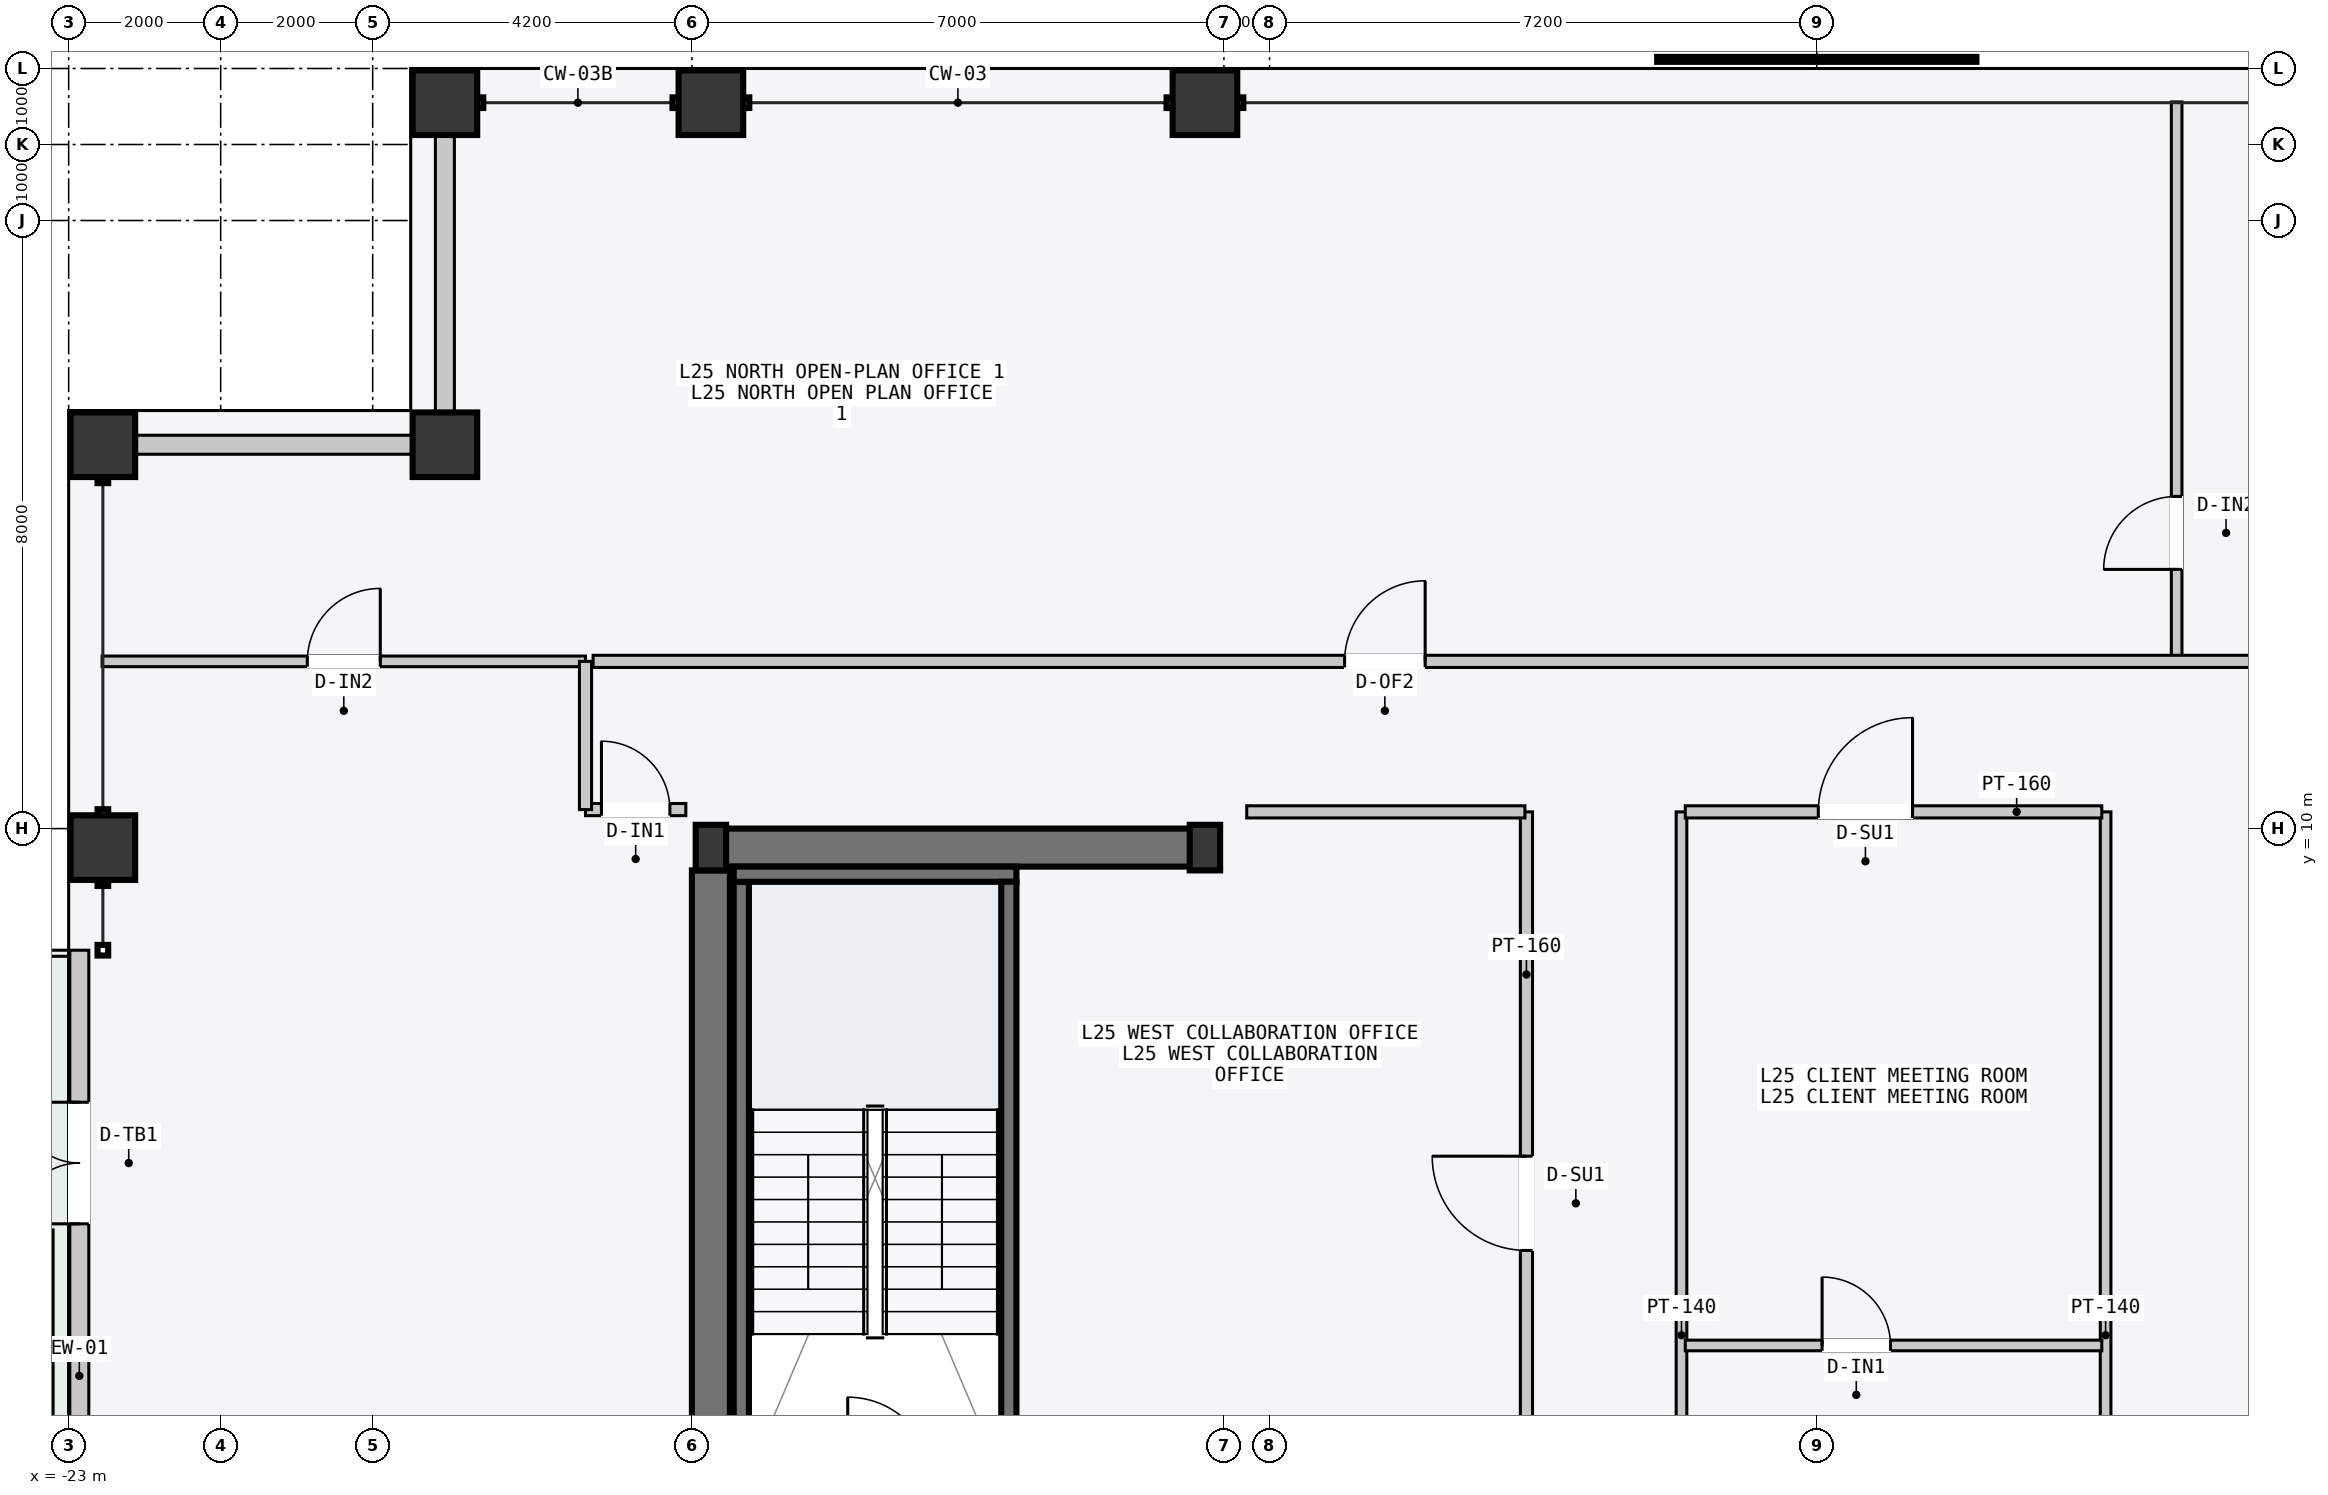
"""IFC4 building model, lengths in metres.
Left out: names, types, materials, properties, quantities, classifications, styles, units other than length and angle.
Written with IfcOpenShell. Run it as: python <this file> out.ifc"""

import sys

from ifc_helpers import new_model, si_unit, direction, frame, frame_2d, origin, origin_2d, place, context, subcontext, project, spatial, rectangle, hollow_rectangle, i_section, extrude, element, fill, save


model = new_model("IFC4")
c1 = context("Model", 3, precision=1e-05, world=origin(), true_north=direction((0.0, 1.0)))
c2 = subcontext(c1, "Body", "Model", "MODEL_VIEW")
j1 = project(units=[si_unit("LENGTHUNIT", "METRE"), si_unit("PLANEANGLEUNIT", "RADIAN")], contexts=[c1])
p1 = place(None, origin())
s1 = spatial("IfcSite", under=j1, at=p1, CompositionType="ELEMENT")
p2 = place(p1, origin())
s2 = spatial("IfcBuilding", under=s1, at=p2, CompositionType="ELEMENT")
p3 = place(p2, frame((0.0, 0.0, 99.0)))
s3 = spatial("IfcBuildingStorey", under=s2, at=p3, CompositionType="ELEMENT", Elevation=99.0)
p4 = place(p3, frame((-14.53, 9.75, -0.2), z_axis=(0.0, 0.0, 1.0), x_axis=(1.0, 0.0, 0.0)))
e1 = element("IfcWall", 1, at=p4, inside=s3, PredefinedType="SHEAR", context=c2, shape_type="SweptSolid", body=[
    extrude(rectangle(XDim=6.46, YDim=0.5, at=frame_2d((3.23, 0.0))), origin(), (0.0, 0.0, 1.0), 3.6),
])
p5 = place(p3, frame((-14.55, 0.3, -0.2), z_axis=(0.0, 0.0, 1.0), x_axis=(0.0, 1.0, 0.0)))
e2 = element("IfcWall", 2, at=p5, inside=s3, PredefinedType="SHEAR", context=c2, shape_type="SweptSolid", body=[
    extrude(rectangle(XDim=9.15, YDim=0.5, at=frame_2d((4.575, 0.0))), origin(), (0.0, 0.0, 1.0), 3.6),
])
p6 = place(p3, frame((-14.15, 1.5, -0.2), z_axis=(0.0, 0.0, 1.0), x_axis=(0.0, 1.0, 0.0)))
e3 = element("IfcWall", 3, at=p6, inside=s3, PredefinedType="SOLIDWALL", context=c2, shape_type="SweptSolid", body=[
    extrude(rectangle(XDim=7.8, YDim=0.2, at=frame_2d((3.9, 0.0))), origin(), (0.0, 0.0, 1.0), 3.6),
])
p7 = place(p3, frame((-14.25, 9.4, -0.2), z_axis=(0.0, 0.0, 1.0), x_axis=(1.0, 0.0, 0.0)))
e4 = element("IfcWall", 4, at=p7, inside=s3, PredefinedType="SOLIDWALL", context=c2, shape_type="SweptSolid", body=[
    extrude(rectangle(XDim=3.72, YDim=0.2, at=frame_2d((1.86, 0.0))), origin(), (0.0, 0.0, 1.0), 3.6),
])
p8 = place(p3, frame((-10.63, 1.5, -0.2), z_axis=(0.0, 0.0, 1.0), x_axis=(0.0, 1.0, 0.0)))
e5 = element("IfcWall", 5, at=p8, inside=s3, PredefinedType="SOLIDWALL", context=c2, shape_type="SweptSolid", body=[
    extrude(rectangle(XDim=7.8, YDim=0.2, at=frame_2d((3.9, 0.0))), origin(), (0.0, 0.0, 1.0), 3.6),
])
for number, where, z_axis, x_axis in (
    (6, (-14.55, 9.75, 0.0), (0.0, 0.0, 1.0), (1.0, 0.0, 0.0)),
    (7, (-8.05, 9.75, 0.0), (0.0, 0.0, 1.0), (1.0, 0.0, 0.0)),
):
    element("IfcColumn", number, at=place(p3, frame(where, z_axis=z_axis, x_axis=x_axis)), inside=s3, PredefinedType="COLUMN", context=c2, shape_type="SweptSolid", body=[
        extrude(i_section(OverallWidth=0.4, OverallDepth=0.6, WebThickness=0.022, FlangeThickness=0.036, at=origin_2d()), origin(), (0.0, 0.0, 1.0), 3.6),
    ])
for number, where, z_axis, x_axis in (
    (8, (-18.05, 19.55, 0.0), (0.0, 0.0, 1.0), (1.0, 0.0, 0.0)),
    (9, (-14.55, 19.55, 0.0), (0.0, 0.0, 1.0), (1.0, 0.0, 0.0)),
    (10, (-8.05, 19.55, 0.0), (0.0, 0.0, 1.0), (1.0, 0.0, 0.0)),
    (11, (-22.55, 9.75, 0.0), (0.0, 0.0, 1.0), (0.0, 1.0, 0.0)),
    (12, (-22.55, 15.05, 0.0), (0.0, 0.0, 1.0), (0.0, 1.0, 0.0)),
    (13, (-18.05, 15.05, 0.0), (0.0, 0.0, 1.0), (1.0, 0.0, 0.0)),
):
    element("IfcColumn", number, at=place(p3, frame(where, z_axis=z_axis, x_axis=x_axis)), inside=s3, PredefinedType="COLUMN", context=c2, shape_type="SweptSolid", body=[
        extrude(hollow_rectangle(XDim=0.85, YDim=0.85, WallThickness=0.04, at=origin_2d()), origin(), (0.0, 0.0, 1.0), 3.6),
    ])
p9 = place(p3, frame((-22.86, -2.4, 0.0), z_axis=(0.0, 0.0, 1.0), x_axis=(0.0, 1.0, 0.0)))
e14 = element("IfcWall", 14, at=p9, inside=s3, PredefinedType="STANDARD", context=c2, shape_type="SweptSolid", body=[
    extrude(rectangle(XDim=10.8, YDim=0.25, at=frame_2d((5.4, 0.0))), origin(), (0.0, 0.0, 1.0), 3.4),
])
p10 = place(p9, frame((7.2, 0.0, 0.0)))
e15 = element("IfcOpeningElement", 15, at=p10, cuts=e14, PredefinedType="OPENING", context=c2, shape_type="SweptSolid", body=[
    extrude(rectangle(XDim=1.6, YDim=2.2, at=frame_2d((0.8, 1.1))), frame((0.0, 0.135, 0.0), z_axis=(0.0, -1.0, 0.0), x_axis=(1.0, 0.0, 0.0)), (0.0, 0.0, 1.0), 0.27),
])
p11 = place(p9, frame((1.2, 0.0, 0.85)))
e16 = element("IfcOpeningElement", 16, at=p11, cuts=e14, PredefinedType="OPENING", context=c2, shape_type="SweptSolid", body=[
    extrude(rectangle(XDim=2.0, YDim=2.1, at=frame_2d((1.0, 1.05))), frame((0.0, 0.135, 0.0), z_axis=(0.0, -1.0, 0.0), x_axis=(1.0, 0.0, 0.0)), (0.0, 0.0, 1.0), 0.27),
])
for number, where, z_axis, x_axis in (
    (17, (-22.115, 15.05, 0.0), (0.0, 0.0, 1.0), (1.0, 0.0, 0.0)),
    (18, (-18.05, 15.485, 0.0), (0.0, 0.0, 1.0), (0.0, 1.0, 0.0)),
):
    element("IfcWall", number, at=place(p3, frame(where, z_axis=z_axis, x_axis=x_axis)), inside=s3, PredefinedType="STANDARD", context=c2, shape_type="SweptSolid", body=[
        extrude(rectangle(XDim=3.63, YDim=0.25, at=frame_2d((1.815, 0.0))), origin(), (0.0, 0.0, 1.0), 2.75),
    ])
p12 = place(p3, frame((-3.82, 1.05, 0.0), z_axis=(0.0, 0.0, 1.0), x_axis=(0.0, 1.0, 0.0)))
e19 = element("IfcWall", 19, at=p12, inside=s3, PredefinedType="PARTITIONING", context=c2, shape_type="SweptSolid", body=[
    extrude(rectangle(XDim=9.17, YDim=0.16, at=frame_2d((4.585, 0.0))), origin(), (0.0, 0.0, 1.0), 3.4),
])
p13 = place(p12, frame((3.4, 0.0, 0.0)))
e20 = element("IfcOpeningElement", 20, at=p13, cuts=e19, PredefinedType="OPENING", context=c2, shape_type="SweptSolid", body=[
    extrude(rectangle(XDim=1.24, YDim=2.24, at=frame_2d((0.62, 1.12))), frame((0.0, 0.09, 0.0), z_axis=(0.0, -1.0, 0.0), x_axis=(1.0, 0.0, 0.0)), (0.0, 0.0, 1.0), 0.18),
])
p14 = place(p3, frame((-7.5, 10.22, 0.0), z_axis=(0.0, 0.0, 1.0), x_axis=(1.0, 0.0, 0.0)))
e21 = element("IfcWall", 21, at=p14, inside=s3, PredefinedType="PARTITIONING", context=c2, shape_type="SweptSolid", body=[
    extrude(rectangle(XDim=3.66, YDim=0.16, at=frame_2d((1.83, 0.0))), origin(), (0.0, 0.0, 1.0), 3.4),
])
for number, where, z_axis, x_axis in (
    (22, (-1.78, -3.55, 0.0), (0.0, 0.0, 1.0), (0.0, 1.0, 0.0)),
    (23, (3.8, -3.55, 0.0), (0.0, 0.0, 1.0), (0.0, 1.0, 0.0)),
):
    element("IfcWall", number, at=place(p3, frame(where, z_axis=z_axis, x_axis=x_axis)), inside=s3, PredefinedType="PARTITIONING", context=c2, shape_type="SweptSolid", body=[
        extrude(rectangle(XDim=13.77, YDim=0.14, at=frame_2d((6.885, 0.0))), origin(), (0.0, 0.0, 1.0), 3.4),
    ])
p15 = place(p3, frame((-1.73, 3.2, 0.0), z_axis=(0.0, 0.0, 1.0), x_axis=(1.0, 0.0, 0.0)))
e24 = element("IfcWall", 24, at=p15, inside=s3, PredefinedType="PARTITIONING", context=c2, shape_type="SweptSolid", body=[
    extrude(rectangle(XDim=5.48, YDim=0.14, at=frame_2d((2.74, 0.0))), origin(), (0.0, 0.0, 1.0), 3.4),
])
p16 = place(p15, frame((1.8, 0.0, 0.0)))
e25 = element("IfcOpeningElement", 25, at=p16, cuts=e24, PredefinedType="OPENING", context=c2, shape_type="SweptSolid", body=[
    extrude(rectangle(XDim=0.9, YDim=2.15, at=frame_2d((0.45, 1.075))), frame((0.0, 0.08, 0.0), z_axis=(0.0, -1.0, 0.0), x_axis=(1.0, 0.0, 0.0)), (0.0, 0.0, 1.0), 0.16),
])
p17 = place(p3, frame((-1.73, 10.22, 0.0), z_axis=(0.0, 0.0, 1.0), x_axis=(1.0, 0.0, 0.0)))
e26 = element("IfcWall", 26, at=p17, inside=s3, PredefinedType="PARTITIONING", context=c2, shape_type="SweptSolid", body=[
    extrude(rectangle(XDim=5.48, YDim=0.16, at=frame_2d((2.74, 0.0))), origin(), (0.0, 0.0, 1.0), 3.4),
])
p18 = place(p17, frame((1.75, 0.0, 0.0)))
e27 = element("IfcOpeningElement", 27, at=p18, cuts=e26, PredefinedType="OPENING", context=c2, shape_type="SweptSolid", body=[
    extrude(rectangle(XDim=1.24, YDim=2.24, at=frame_2d((0.62, 1.12))), frame((0.0, 0.09, 0.0), z_axis=(0.0, -1.0, 0.0), x_axis=(1.0, 0.0, 0.0)), (0.0, 0.0, 1.0), 0.18),
])
p19 = place(p3, frame((4.735, 12.26, 0.0), z_axis=(0.0, 0.0, 1.0), x_axis=(0.0, 1.0, 0.0)))
e28 = element("IfcWall", 28, at=p19, inside=s3, PredefinedType="PARTITIONING", context=c2, shape_type="SweptSolid", body=[
    extrude(rectangle(XDim=7.3, YDim=0.14, at=frame_2d((3.65, 0.0))), origin(), (0.0, 0.0, 1.0), 3.4),
])
p20 = place(p19, frame((1.15, 0.0, 0.0)))
e29 = element("IfcOpeningElement", 29, at=p20, cuts=e28, PredefinedType="OPENING", context=c2, shape_type="SweptSolid", body=[
    extrude(rectangle(XDim=0.96, YDim=2.18, at=frame_2d((0.48, 1.09))), frame((0.0, 0.08, 0.0), z_axis=(0.0, -1.0, 0.0), x_axis=(1.0, 0.0, 0.0)), (0.0, 0.0, 1.0), 0.16),
])
p21 = place(p3, frame((-16.1, 12.2, 0.0), z_axis=(0.0, 0.0, 1.0), x_axis=(1.0, 0.0, 0.0)))
e30 = element("IfcWall", 30, at=p21, inside=s3, PredefinedType="PARTITIONING", context=c2, shape_type="SweptSolid", body=[
    extrude(rectangle(XDim=32.2, YDim=0.16, at=frame_2d((16.1, 0.0))), origin(), (0.0, 0.0, 1.0), 3.4),
])
p22 = place(p21, frame((9.887, 0.0, 0.0)))
e31 = element("IfcOpeningElement", 31, at=p22, cuts=e30, PredefinedType="OPENING", context=c2, shape_type="SweptSolid", body=[
    extrude(rectangle(XDim=1.06, YDim=2.2, at=frame_2d((0.53, 1.1))), frame((0.0, 0.09, 0.0), z_axis=(0.0, -1.0, 0.0), x_axis=(1.0, 0.0, 0.0)), (0.0, 0.0, 1.0), 0.18),
])
p23 = place(p21, frame((25.897, 0.0, 0.0)))
e32 = element("IfcOpeningElement", 32, at=p23, cuts=e30, PredefinedType="OPENING", context=c2, shape_type="SweptSolid", body=[
    extrude(rectangle(XDim=1.24, YDim=2.24, at=frame_2d((0.62, 1.12))), frame((0.0, 0.09, 0.0), z_axis=(0.0, -1.0, 0.0), x_axis=(1.0, 0.0, 0.0)), (0.0, 0.0, 1.0), 0.18),
])
p24 = place(p3, frame((-22.56, 12.2, 0.0), z_axis=(0.0, 0.0, 1.0), x_axis=(1.0, 0.0, 0.0)))
e33 = element("IfcWall", 33, at=p24, inside=s3, PredefinedType="PARTITIONING", context=c2, shape_type="SweptSolid", body=[
    extrude(rectangle(XDim=6.36, YDim=0.14, at=frame_2d((3.18, 0.0))), origin(), (0.0, 0.0, 1.0), 3.4),
])
p25 = place(p24, frame((2.7, 0.0, 0.0)))
e34 = element("IfcOpeningElement", 34, at=p25, cuts=e33, PredefinedType="OPENING", context=c2, shape_type="SweptSolid", body=[
    extrude(rectangle(XDim=0.96, YDim=2.18, at=frame_2d((0.48, 1.09))), frame((0.0, 0.08, 0.0), z_axis=(0.0, -1.0, 0.0), x_axis=(1.0, 0.0, 0.0)), (0.0, 0.0, 1.0), 0.16),
])
p26 = place(p3, frame((-16.2, 10.25, 0.0), z_axis=(0.0, 0.0, 1.0), x_axis=(1.0, 0.0, 0.0)))
e35 = element("IfcWall", 35, at=p26, inside=s3, PredefinedType="PARTITIONING", context=c2, shape_type="SweptSolid", body=[
    extrude(rectangle(XDim=1.32, YDim=0.16, at=frame_2d((0.66, 0.0))), origin(), (0.0, 0.0, 1.0), 3.4),
])
p27 = place(p26, frame((0.21, 0.0, 0.0)))
e36 = element("IfcOpeningElement", 36, at=p27, cuts=e35, PredefinedType="OPENING", context=c2, shape_type="SweptSolid", body=[
    extrude(rectangle(XDim=0.9, YDim=2.15, at=frame_2d((0.45, 1.075))), frame((0.0, 0.09, 0.0), z_axis=(0.0, -1.0, 0.0), x_axis=(1.0, 0.0, 0.0)), (0.0, 0.0, 1.0), 0.18),
])
p28 = place(p3, frame((-16.2, 10.25, 0.0), z_axis=(0.0, 0.0, 1.0), x_axis=(0.0, 1.0, 0.0)))
e37 = element("IfcWall", 37, at=p28, inside=s3, PredefinedType="PARTITIONING", context=c2, shape_type="SweptSolid", body=[
    extrude(rectangle(XDim=1.95, YDim=0.16, at=frame_2d((0.975, 0.0))), origin(), (0.0, 0.0, 1.0), 3.4),
])
p29 = place(p10, origin())
e38 = element("IfcDoor", 38, at=p29, inside=s3, OperationType="DOUBLE_DOOR_SINGLE_SWING", PredefinedType="DOOR", context=c2, shape_type="SweptSolid", body=[
    extrude(rectangle(XDim=1.6, YDim=2.2, at=frame_2d((0.8, 1.1))), frame((0.0, 0.025, 0.0), z_axis=(0.0, -1.0, 0.0), x_axis=(1.0, 0.0, 0.0)), (0.0, 0.0, 1.0), 0.05),
])
fill(e15, e38)
p30 = place(p13, origin())
e39 = element("IfcDoor", 39, at=p30, inside=s3, OperationType="SINGLE_SWING_RIGHT", PredefinedType="DOOR", context=c2, shape_type="SweptSolid", body=[
    extrude(rectangle(XDim=1.24, YDim=2.24, at=frame_2d((0.62, 1.12))), frame((0.0, 0.025, 0.0), z_axis=(0.0, -1.0, 0.0), x_axis=(1.0, 0.0, 0.0)), (0.0, 0.0, 1.0), 0.05),
])
fill(e20, e39)
p31 = place(p16, origin())
e40 = element("IfcDoor", 40, at=p31, inside=s3, OperationType="SINGLE_SWING_LEFT", PredefinedType="DOOR", context=c2, shape_type="SweptSolid", body=[
    extrude(rectangle(XDim=0.9, YDim=2.15, at=frame_2d((0.45, 1.075))), frame((0.0, 0.025, 0.0), z_axis=(0.0, -1.0, 0.0), x_axis=(1.0, 0.0, 0.0)), (0.0, 0.0, 1.0), 0.05),
])
fill(e25, e40)
p32 = place(p18, origin())
e41 = element("IfcDoor", 41, at=p32, inside=s3, OperationType="SINGLE_SWING_RIGHT", PredefinedType="DOOR", context=c2, shape_type="SweptSolid", body=[
    extrude(rectangle(XDim=1.24, YDim=2.24, at=frame_2d((0.62, 1.12))), frame((0.0, 0.025, 0.0), z_axis=(0.0, -1.0, 0.0), x_axis=(1.0, 0.0, 0.0)), (0.0, 0.0, 1.0), 0.05),
])
fill(e27, e41)
p33 = place(p20, origin())
e42 = element("IfcDoor", 42, at=p33, inside=s3, OperationType="SINGLE_SWING_LEFT", PredefinedType="DOOR", context=c2, shape_type="SweptSolid", body=[
    extrude(rectangle(XDim=0.96, YDim=2.18, at=frame_2d((0.48, 1.09))), frame((0.0, 0.025, 0.0), z_axis=(0.0, -1.0, 0.0), x_axis=(1.0, 0.0, 0.0)), (0.0, 0.0, 1.0), 0.05),
])
fill(e29, e42)
p34 = place(p22, origin())
e43 = element("IfcDoor", 43, at=p34, inside=s3, OperationType="SINGLE_SWING_RIGHT", PredefinedType="DOOR", context=c2, shape_type="SweptSolid", body=[
    extrude(rectangle(XDim=1.06, YDim=2.2, at=frame_2d((0.53, 1.1))), frame((0.0, 0.025, 0.0), z_axis=(0.0, -1.0, 0.0), x_axis=(1.0, 0.0, 0.0)), (0.0, 0.0, 1.0), 0.05),
])
fill(e31, e43)
p35 = place(p25, origin())
e44 = element("IfcDoor", 44, at=p35, inside=s3, OperationType="SINGLE_SWING_RIGHT", PredefinedType="DOOR", context=c2, shape_type="SweptSolid", body=[
    extrude(rectangle(XDim=0.96, YDim=2.18, at=frame_2d((0.48, 1.09))), frame((0.0, 0.025, 0.0), z_axis=(0.0, -1.0, 0.0), x_axis=(1.0, 0.0, 0.0)), (0.0, 0.0, 1.0), 0.05),
])
fill(e34, e44)
p36 = place(p27, origin())
e45 = element("IfcDoor", 45, at=p36, inside=s3, OperationType="SINGLE_SWING_LEFT", PredefinedType="DOOR", context=c2, shape_type="SweptSolid", body=[
    extrude(rectangle(XDim=0.9, YDim=2.15, at=frame_2d((0.45, 1.075))), frame((0.0, 0.025, 0.0), z_axis=(0.0, -1.0, 0.0), x_axis=(1.0, 0.0, 0.0)), (0.0, 0.0, 1.0), 0.05),
])
fill(e36, e45)
save(model, sys.argv[1])
